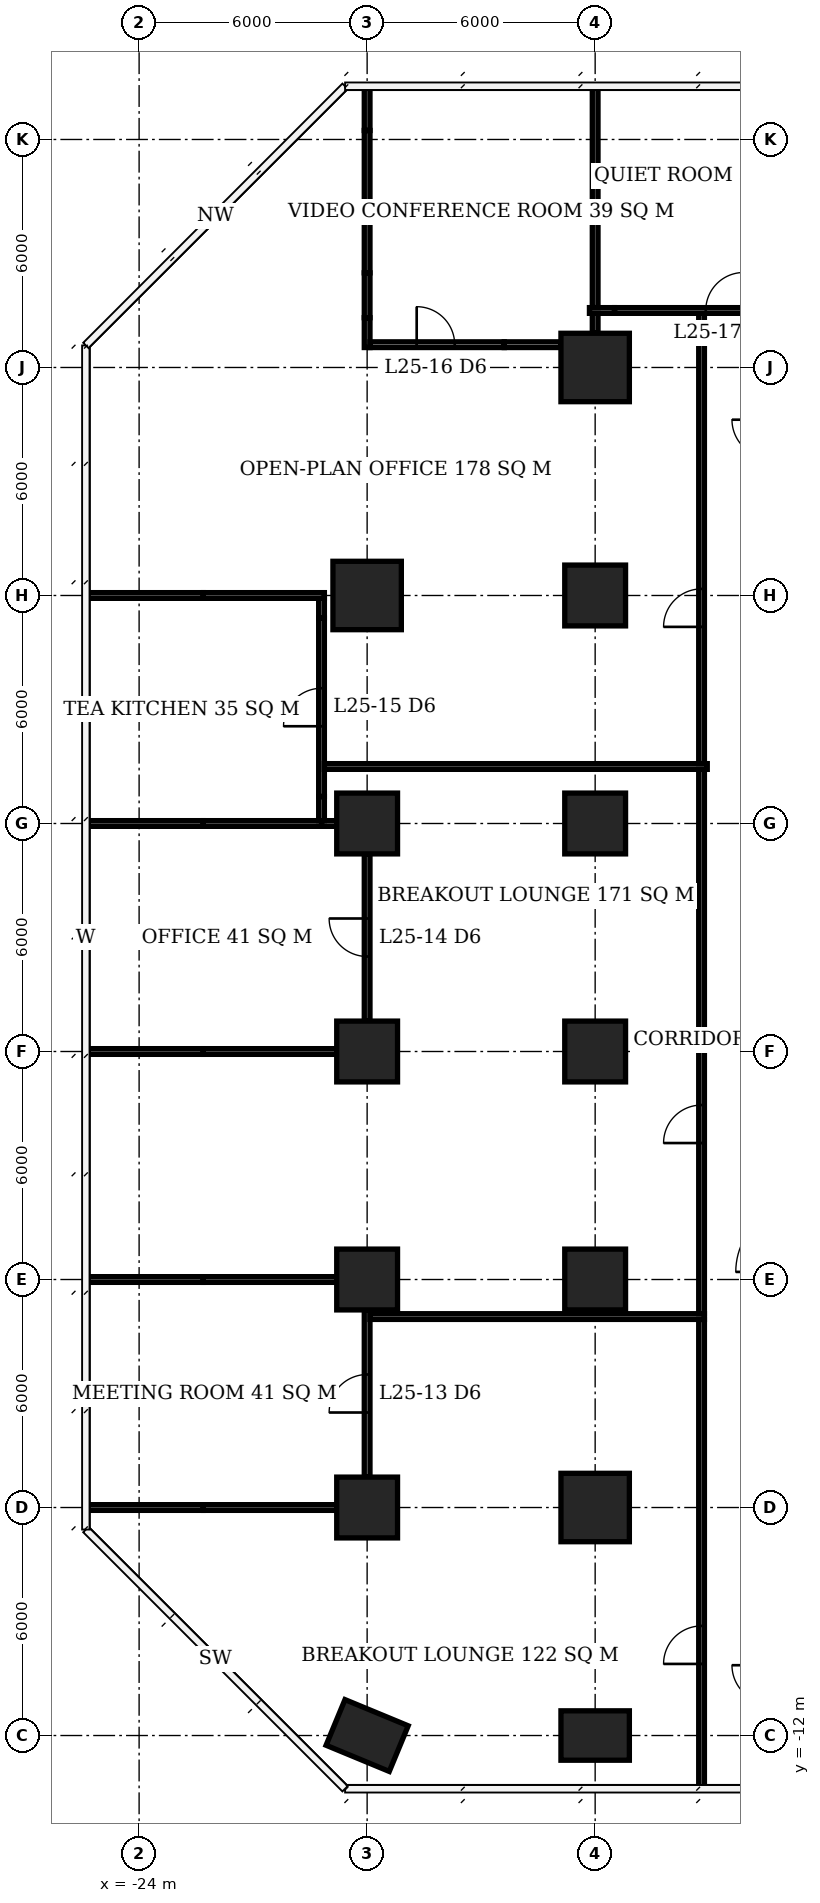
"""IFC4 building model, lengths in metres.
Left out: names, types, materials, properties, quantities, classifications, styles, units other than length and angle.
Written with IfcOpenShell. Run it as: python <this file> out.ifc"""

import sys

from ifc_helpers import new_model, si_unit, direction, frame, frame_2d, origin, origin_2d, place, context, subcontext, project, spatial, rectangle, extrude, element, fill, save


model = new_model("IFC4")
c1 = context("Model", 3, precision=1e-05, world=origin(), true_north=direction((0.0, 1.0)))
c2 = subcontext(c1, "Body", "Model", "MODEL_VIEW")
j1 = project(units=[si_unit("LENGTHUNIT", "METRE"), si_unit("PLANEANGLEUNIT", "RADIAN")], contexts=[c1])
p1 = place(None, origin())
s1 = spatial("IfcSite", under=j1, at=p1, CompositionType="ELEMENT")
p2 = place(p1, origin())
s2 = spatial("IfcBuilding", under=s1, at=p2, CompositionType="ELEMENT")
p3 = place(p2, frame((0.0, 0.0, 105.5)))
s3 = spatial("IfcBuildingStorey", under=s2, at=p3, CompositionType="ELEMENT", Elevation=105.5)
p4 = place(p3, frame((-18.0, -12.0, 0.0), z_axis=(0.0, 0.0, 1.0), x_axis=(-0.923879532511, 0.382683432365, 0.0)))
e1 = element("IfcColumn", 1, at=p4, inside=s3, PredefinedType="COLUMN", context=c2, shape_type="SweptSolid", body=[
    extrude(rectangle(XDim=1.8, YDim=1.3, at=origin_2d()), origin(), (0.0, 0.0, 1.0), 3.9),
])
for number, where, z_axis, x_axis in (
    (2, (-18.0, -6.0, 0.0), (0.0, 0.0, 1.0), (1.0, 0.0, 0.0)),
    (3, (-18.0, 0.0, 0.0), (0.0, 0.0, 1.0), (1.0, 0.0, 0.0)),
    (4, (-18.0, 6.0, 0.0), (0.0, 0.0, 1.0), (1.0, 0.0, 0.0)),
    (5, (-18.0, 12.0, 0.0), (0.0, 0.0, 1.0), (1.0, 0.0, 0.0)),
):
    element("IfcColumn", number, at=place(p3, frame(where, z_axis=z_axis, x_axis=x_axis)), inside=s3, PredefinedType="COLUMN", context=c2, shape_type="SweptSolid", body=[
        extrude(rectangle(XDim=1.6, YDim=1.6, at=origin_2d()), origin(), (0.0, 0.0, 1.0), 3.9),
    ])
p5 = place(p3, frame((-18.0, 18.0, 0.0), z_axis=(0.0, 0.0, 1.0), x_axis=(1.0, 0.0, 0.0)))
e6 = element("IfcColumn", 6, at=p5, inside=s3, PredefinedType="COLUMN", context=c2, shape_type="SweptSolid", body=[
    extrude(rectangle(XDim=1.8, YDim=1.8, at=origin_2d()), origin(), (0.0, 0.0, 1.0), 3.9),
])
p6 = place(p3, frame((-12.0, -12.0, 0.0), z_axis=(0.0, 0.0, 1.0), x_axis=(1.0, 0.0, 0.0)))
e7 = element("IfcColumn", 7, at=p6, inside=s3, PredefinedType="COLUMN", context=c2, shape_type="SweptSolid", body=[
    extrude(rectangle(XDim=1.8, YDim=1.3, at=origin_2d()), origin(), (0.0, 0.0, 1.0), 3.9),
])
p7 = place(p3, frame((-12.0, -6.0, 0.0), z_axis=(0.0, 0.0, 1.0), x_axis=(1.0, 0.0, 0.0)))
e8 = element("IfcColumn", 8, at=p7, inside=s3, PredefinedType="COLUMN", context=c2, shape_type="SweptSolid", body=[
    extrude(rectangle(XDim=1.8, YDim=1.8, at=origin_2d()), origin(), (0.0, 0.0, 1.0), 3.9),
])
for number, where, z_axis, x_axis in (
    (9, (-12.0, 0.0, 0.0), (0.0, 0.0, 1.0), (1.0, 0.0, 0.0)),
    (10, (-12.0, 6.0, 0.0), (0.0, 0.0, 1.0), (1.0, 0.0, 0.0)),
    (11, (-12.0, 12.0, 0.0), (0.0, 0.0, 1.0), (1.0, 0.0, 0.0)),
    (12, (-12.0, 18.0, 0.0), (0.0, 0.0, 1.0), (1.0, 0.0, 0.0)),
):
    element("IfcColumn", number, at=place(p3, frame(where, z_axis=z_axis, x_axis=x_axis)), inside=s3, PredefinedType="COLUMN", context=c2, shape_type="SweptSolid", body=[
        extrude(rectangle(XDim=1.6, YDim=1.6, at=origin_2d()), origin(), (0.0, 0.0, 1.0), 3.9),
    ])
p8 = place(p3, frame((-12.0, 24.0, 0.0), z_axis=(0.0, 0.0, 1.0), x_axis=(1.0, 0.0, 0.0)))
e13 = element("IfcColumn", 13, at=p8, inside=s3, PredefinedType="COLUMN", context=c2, shape_type="SweptSolid", body=[
    extrude(rectangle(XDim=1.8, YDim=1.8, at=origin_2d()), origin(), (0.0, 0.0, 1.0), 3.9),
])
p9 = place(p3, frame((-25.4, -6.0, 0.0), z_axis=(0.0, 0.0, 1.0), x_axis=(1.0, 0.0, 0.0)))
e14 = element("IfcWall", 14, at=p9, inside=s3, PredefinedType="PARTITIONING", context=c2, shape_type="SweptSolid", body=[
    extrude(rectangle(XDim=3.09, YDim=0.15, at=frame_2d((1.545, 0.0))), origin(), (0.0, 0.0, 1.0), 3.65),
])
p10 = place(p3, frame((-22.31, -6.0, 0.0), z_axis=(0.0, 0.0, 1.0), x_axis=(1.0, 0.0, 0.0)))
e15 = element("IfcWall", 15, at=p10, inside=s3, PredefinedType="PARTITIONING", context=c2, shape_type="SweptSolid", body=[
    extrude(rectangle(XDim=3.51, YDim=0.15, at=frame_2d((1.755, 0.0))), origin(), (0.0, 0.0, 1.0), 2.65),
])
p11 = place(p3, frame((-25.4, 0.0, 0.0), z_axis=(0.0, 0.0, 1.0), x_axis=(1.0, 0.0, 0.0)))
e16 = element("IfcWall", 16, at=p11, inside=s3, PredefinedType="PARTITIONING", context=c2, shape_type="SweptSolid", body=[
    extrude(rectangle(XDim=3.09, YDim=0.15, at=frame_2d((1.545, 0.0))), origin(), (0.0, 0.0, 1.0), 3.65),
])
p12 = place(p3, frame((-22.31, 0.0, 0.0), z_axis=(0.0, 0.0, 1.0), x_axis=(1.0, 0.0, 0.0)))
e17 = element("IfcWall", 17, at=p12, inside=s3, PredefinedType="PARTITIONING", context=c2, shape_type="SweptSolid", body=[
    extrude(rectangle(XDim=3.51, YDim=0.15, at=frame_2d((1.755, 0.0))), origin(), (0.0, 0.0, 1.0), 2.65),
])
p13 = place(p3, frame((-25.35, 6.0, 0.0), z_axis=(0.0, 0.0, 1.0), x_axis=(1.0, 0.0, 0.0)))
e18 = element("IfcWall", 18, at=p13, inside=s3, PredefinedType="PARTITIONING", context=c2, shape_type="SweptSolid", body=[
    extrude(rectangle(XDim=3.04, YDim=0.15, at=frame_2d((1.52, 0.0))), origin(), (0.0, 0.0, 1.0), 3.65),
])
p14 = place(p3, frame((-22.31, 6.0, 0.0), z_axis=(0.0, 0.0, 1.0), x_axis=(1.0, 0.0, 0.0)))
e19 = element("IfcWall", 19, at=p14, inside=s3, PredefinedType="PARTITIONING", context=c2, shape_type="SweptSolid", body=[
    extrude(rectangle(XDim=3.51, YDim=0.15, at=frame_2d((1.755, 0.0))), origin(), (0.0, 0.0, 1.0), 2.65),
])
p15 = place(p3, frame((-25.35, 12.0, 0.0), z_axis=(0.0, 0.0, 1.0), x_axis=(1.0, 0.0, 0.0)))
e20 = element("IfcWall", 20, at=p15, inside=s3, PredefinedType="PARTITIONING", context=c2, shape_type="SweptSolid", body=[
    extrude(rectangle(XDim=3.04, YDim=0.15, at=frame_2d((1.52, 0.0))), origin(), (0.0, 0.0, 1.0), 3.65),
])
p16 = place(p3, frame((-22.31, 12.0, 0.0), z_axis=(0.0, 0.0, 1.0), x_axis=(1.0, 0.0, 0.0)))
e21 = element("IfcWall", 21, at=p16, inside=s3, PredefinedType="PARTITIONING", context=c2, shape_type="SweptSolid", body=[
    extrude(rectangle(XDim=3.185, YDim=0.15, at=frame_2d((1.593, 0.0))), origin(), (0.0, 0.0, 1.0), 2.65),
])
p17 = place(p3, frame((-19.2, 12.0, 0.0), z_axis=(0.0, 0.0, 1.0), x_axis=(1.0, 0.0, 0.0)))
e22 = element("IfcWall", 22, at=p17, inside=s3, PredefinedType="PARTITIONING", context=c2, shape_type="SweptSolid", body=[
    extrude(rectangle(XDim=0.4, YDim=0.15, at=frame_2d((0.2, 0.0))), origin(), (0.0, 0.0, 1.0), 2.65),
])
p18 = place(p3, frame((-25.4, 18.0, 0.0), z_axis=(0.0, 0.0, 1.0), x_axis=(1.0, 0.0, 0.0)))
e23 = element("IfcWall", 23, at=p18, inside=s3, PredefinedType="PARTITIONING", context=c2, shape_type="SweptSolid", body=[
    extrude(rectangle(XDim=3.09, YDim=0.15, at=frame_2d((1.545, 0.0))), origin(), (0.0, 0.0, 1.0), 3.65),
])
p19 = place(p3, frame((-22.31, 18.0, 0.0), z_axis=(0.0, 0.0, 1.0), x_axis=(1.0, 0.0, 0.0)))
e24 = element("IfcWall", 24, at=p19, inside=s3, PredefinedType="PARTITIONING", context=c2, shape_type="SweptSolid", body=[
    extrude(rectangle(XDim=3.185, YDim=0.15, at=frame_2d((1.593, 0.0))), origin(), (0.0, 0.0, 1.0), 2.65),
])
p20 = place(p3, frame((-17.925, 24.6, 0.0), z_axis=(0.0, 0.0, 1.0), x_axis=(1.0, 0.0, 0.0)))
e25 = element("IfcWall", 25, at=p20, inside=s3, PredefinedType="PARTITIONING", context=c2, shape_type="SweptSolid", body=[
    extrude(rectangle(XDim=3.533, YDim=0.15, at=frame_2d((1.767, 0.0))), origin(), (0.0, 0.0, 1.0), 3.65),
])
p21 = place(p20, frame((1.229, 0.0, 0.0)))
e26 = element("IfcOpeningElement", 26, at=p21, cuts=e25, PredefinedType="OPENING", context=c2, shape_type="SweptSolid", body=[
    extrude(rectangle(XDim=1.0, YDim=2.1, at=frame_2d((0.5, 1.05))), frame((0.0, 0.085, 0.0), z_axis=(0.0, -1.0, 0.0), x_axis=(1.0, 0.0, 0.0)), (0.0, 0.0, 1.0), 0.17),
])
p22 = place(p3, frame((-14.392, 24.6, 0.0), z_axis=(0.0, 0.0, 1.0), x_axis=(1.0, 0.0, 0.0)))
e27 = element("IfcWall", 27, at=p22, inside=s3, PredefinedType="PARTITIONING", context=c2, shape_type="SweptSolid", body=[
    extrude(rectangle(XDim=1.492, YDim=0.15, at=frame_2d((0.746, 0.0))), origin(), (0.0, 0.0, 1.0), 2.65),
])
p23 = place(p3, frame((-12.15, 25.5, 0.0), z_axis=(0.0, 0.0, 1.0), x_axis=(1.0, 0.0, 0.0)))
e28 = element("IfcWall", 28, at=p23, inside=s3, PredefinedType="PARTITIONING", context=c2, shape_type="SweptSolid", body=[
    extrude(rectangle(XDim=0.66, YDim=0.15, at=frame_2d((0.33, 0.0))), origin(), (0.0, 0.0, 1.0), 2.65),
])
p24 = place(p3, frame((-11.49, 25.5, 0.0), z_axis=(0.0, 0.0, 1.0), x_axis=(1.0, 0.0, 0.0)))
e29 = element("IfcWall", 29, at=p24, inside=s3, PredefinedType="PARTITIONING", context=c2, shape_type="SweptSolid", body=[
    extrude(rectangle(XDim=4.78, YDim=0.15, at=frame_2d((2.39, 0.0))), origin(), (0.0, 0.0, 1.0), 3.65),
])
p25 = place(p24, frame((2.4, 0.0, 0.0)))
e30 = element("IfcOpeningElement", 30, at=p25, cuts=e29, PredefinedType="OPENING", context=c2, shape_type="SweptSolid", body=[
    extrude(rectangle(XDim=1.0, YDim=2.1, at=frame_2d((0.5, 1.05))), frame((0.0, 0.085, 0.0), z_axis=(0.0, -1.0, 0.0), x_axis=(1.0, 0.0, 0.0)), (0.0, 0.0, 1.0), 0.17),
])
p26 = place(p3, frame((-19.2, 12.075, 0.0), z_axis=(0.0, 0.0, 1.0), x_axis=(0.0, 1.0, 0.0)))
e31 = element("IfcWall", 31, at=p26, inside=s3, PredefinedType="PARTITIONING", context=c2, shape_type="SweptSolid", body=[
    extrude(rectangle(XDim=0.635, YDim=0.15, at=frame_2d((0.317, 0.0))), origin(), (0.0, 0.0, 1.0), 2.65),
])
p27 = place(p3, frame((-19.2, 12.71, 0.0), z_axis=(0.0, 0.0, 1.0), x_axis=(0.0, 1.0, 0.0)))
e32 = element("IfcWall", 32, at=p27, inside=s3, PredefinedType="PARTITIONING", context=c2, shape_type="SweptSolid", body=[
    extrude(rectangle(XDim=4.698, YDim=0.15, at=frame_2d((2.349, 0.0))), origin(), (0.0, 0.0, 1.0), 3.65),
])
p28 = place(p27, frame((1.849, 0.0, 0.0)))
e33 = element("IfcOpeningElement", 33, at=p28, cuts=e32, PredefinedType="OPENING", context=c2, shape_type="SweptSolid", body=[
    extrude(rectangle(XDim=1.0, YDim=2.1, at=frame_2d((0.5, 1.05))), frame((0.0, 0.085, 0.0), z_axis=(0.0, -1.0, 0.0), x_axis=(1.0, 0.0, 0.0)), (0.0, 0.0, 1.0), 0.17),
])
p29 = place(p3, frame((-19.2, 17.408, 0.0), z_axis=(0.0, 0.0, 1.0), x_axis=(0.0, 1.0, 0.0)))
e34 = element("IfcWall", 34, at=p29, inside=s3, PredefinedType="PARTITIONING", context=c2, shape_type="SweptSolid", body=[
    extrude(rectangle(XDim=0.517, YDim=0.15, at=frame_2d((0.259, 0.0))), origin(), (0.0, 0.0, 1.0), 2.65),
])
p30 = place(p3, frame((-18.0, -5.2, 0.0), z_axis=(0.0, 0.0, 1.0), x_axis=(0.0, 1.0, 0.0)))
e35 = element("IfcWall", 35, at=p30, inside=s3, PredefinedType="PARTITIONING", context=c2, shape_type="SweptSolid", body=[
    extrude(rectangle(XDim=4.4, YDim=0.15, at=frame_2d((2.2, 0.0))), origin(), (0.0, 0.0, 1.0), 3.65),
])
p31 = place(p30, frame((1.7, 0.0, 0.0)))
e36 = element("IfcOpeningElement", 36, at=p31, cuts=e35, PredefinedType="OPENING", context=c2, shape_type="SweptSolid", body=[
    extrude(rectangle(XDim=1.0, YDim=2.1, at=frame_2d((0.5, 1.05))), frame((0.0, 0.085, 0.0), z_axis=(0.0, -1.0, 0.0), x_axis=(1.0, 0.0, 0.0)), (0.0, 0.0, 1.0), 0.17),
])
p32 = place(p3, frame((-18.0, 6.8, 0.0), z_axis=(0.0, 0.0, 1.0), x_axis=(0.0, 1.0, 0.0)))
e37 = element("IfcWall", 37, at=p32, inside=s3, PredefinedType="PARTITIONING", context=c2, shape_type="SweptSolid", body=[
    extrude(rectangle(XDim=4.4, YDim=0.15, at=frame_2d((2.2, 0.0))), origin(), (0.0, 0.0, 1.0), 3.65),
])
p33 = place(p32, frame((1.7, 0.0, 0.0)))
e38 = element("IfcOpeningElement", 38, at=p33, cuts=e37, PredefinedType="OPENING", context=c2, shape_type="SweptSolid", body=[
    extrude(rectangle(XDim=1.0, YDim=2.1, at=frame_2d((0.5, 1.05))), frame((0.0, 0.085, 0.0), z_axis=(0.0, -1.0, 0.0), x_axis=(1.0, 0.0, 0.0)), (0.0, 0.0, 1.0), 0.17),
])
p34 = place(p3, frame((-18.0, 24.525, 0.0), z_axis=(0.0, 0.0, 1.0), x_axis=(0.0, 1.0, 0.0)))
e39 = element("IfcWall", 39, at=p34, inside=s3, PredefinedType="PARTITIONING", context=c2, shape_type="SweptSolid", body=[
    extrude(rectangle(XDim=0.785, YDim=0.15, at=frame_2d((0.393, 0.0))), origin(), (0.0, 0.0, 1.0), 3.65),
])
p35 = place(p3, frame((-18.0, 25.31, 0.0), z_axis=(0.0, 0.0, 1.0), x_axis=(0.0, 1.0, 0.0)))
e40 = element("IfcWall", 40, at=p35, inside=s3, PredefinedType="PARTITIONING", context=c2, shape_type="SweptSolid", body=[
    extrude(rectangle(XDim=1.18, YDim=0.15, at=frame_2d((0.59, 0.0))), origin(), (0.0, 0.0, 1.0), 2.65),
])
p36 = place(p3, frame((-18.0, 26.49, 0.0), z_axis=(0.0, 0.0, 1.0), x_axis=(0.0, 1.0, 0.0)))
e41 = element("IfcWall", 41, at=p36, inside=s3, PredefinedType="PARTITIONING", context=c2, shape_type="SweptSolid", body=[
    extrude(rectangle(XDim=1.718, YDim=0.15, at=frame_2d((0.859, 0.0))), origin(), (0.0, 0.0, 1.0), 3.65),
])
p37 = place(p3, frame((-18.0, 28.208, 0.0), z_axis=(0.0, 0.0, 1.0), x_axis=(0.0, 1.0, 0.0)))
e42 = element("IfcWall", 42, at=p37, inside=s3, PredefinedType="PARTITIONING", context=c2, shape_type="SweptSolid", body=[
    extrude(rectangle(XDim=2.029, YDim=0.15, at=frame_2d((1.015, 0.0))), origin(), (0.0, 0.0, 1.0), 2.65),
])
p38 = place(p3, frame((-18.0, 30.237, 0.0), z_axis=(0.0, 0.0, 1.0), x_axis=(0.0, 1.0, 0.0)))
e43 = element("IfcWall", 43, at=p38, inside=s3, PredefinedType="PARTITIONING", context=c2, shape_type="SweptSolid", body=[
    extrude(rectangle(XDim=1.163, YDim=0.15, at=frame_2d((0.582, 0.0))), origin(), (0.0, 0.0, 1.0), 3.65),
])
p39 = place(p3, frame((-12.0, 24.9, 0.0), z_axis=(0.0, 0.0, 1.0), x_axis=(0.0, 1.0, 0.0)))
e44 = element("IfcWall", 44, at=p39, inside=s3, PredefinedType="PARTITIONING", context=c2, shape_type="SweptSolid", body=[
    extrude(rectangle(XDim=0.525, YDim=0.15, at=frame_2d((0.263, 0.0))), origin(), (0.0, 0.0, 1.0), 2.65),
])
p40 = place(p3, frame((-12.0, 25.575, 0.0), z_axis=(0.0, 0.0, 1.0), x_axis=(0.0, 1.0, 0.0)))
e45 = element("IfcWall", 45, at=p40, inside=s3, PredefinedType="PARTITIONING", context=c2, shape_type="SweptSolid", body=[
    extrude(rectangle(XDim=2.735, YDim=0.15, at=frame_2d((1.368, 0.0))), origin(), (0.0, 0.0, 1.0), 2.65),
])
p41 = place(p3, frame((-12.0, 28.31, 0.0), z_axis=(0.0, 0.0, 1.0), x_axis=(0.0, 1.0, 0.0)))
e46 = element("IfcWall", 46, at=p41, inside=s3, PredefinedType="PARTITIONING", context=c2, shape_type="SweptSolid", body=[
    extrude(rectangle(XDim=3.09, YDim=0.15, at=frame_2d((1.545, 0.0))), origin(), (0.0, 0.0, 1.0), 3.65),
])
p42 = place(p3, frame((-19.125, 13.5, 0.0), z_axis=(0.0, 0.0, 1.0), x_axis=(1.0, 0.0, 0.0)))
e47 = element("IfcWall", 47, at=p42, inside=s3, PredefinedType="PARTITIONING", context=c2, shape_type="SweptSolid", body=[
    extrude(rectangle(XDim=10.075, YDim=0.15, at=frame_2d((5.038, 0.0))), origin(), (0.0, 0.0, 1.0), 3.65),
])
p43 = place(p3, frame((-17.925, -0.975, 0.0), z_axis=(0.0, 0.0, 1.0), x_axis=(1.0, 0.0, 0.0)))
e48 = element("IfcWall", 48, at=p43, inside=s3, PredefinedType="PARTITIONING", context=c2, shape_type="SweptSolid", body=[
    extrude(rectangle(XDim=8.8, YDim=0.15, at=frame_2d((4.4, 0.0))), origin(), (0.0, 0.0, 1.0), 3.65),
])
p44 = place(p3, frame((-9.2, -13.35, 0.0), z_axis=(0.0, 0.0, 1.0), x_axis=(0.0, 1.0, 0.0)))
e49 = element("IfcWall", 49, at=p44, inside=s3, PredefinedType="PARTITIONING", context=c2, shape_type="SweptSolid", body=[
    extrude(rectangle(XDim=12.3, YDim=0.15, at=frame_2d((6.15, 0.0))), origin(), (0.0, 0.0, 1.0), 3.65),
])
p45 = place(p44, frame((3.234, 0.0, 0.0)))
e50 = element("IfcOpeningElement", 50, at=p45, cuts=e49, PredefinedType="OPENING", context=c2, shape_type="SweptSolid", body=[
    extrude(rectangle(XDim=1.0, YDim=2.1, at=frame_2d((0.5, 1.05))), frame((0.0, 0.085, 0.0), z_axis=(0.0, -1.0, 0.0), x_axis=(1.0, 0.0, 0.0)), (0.0, 0.0, 1.0), 0.17),
])
p46 = place(p3, frame((-9.2, -0.9, 0.0), z_axis=(0.0, 0.0, 1.0), x_axis=(0.0, 1.0, 0.0)))
e51 = element("IfcWall", 51, at=p46, inside=s3, PredefinedType="PARTITIONING", context=c2, shape_type="SweptSolid", body=[
    extrude(rectangle(XDim=14.325, YDim=0.15, at=frame_2d((7.163, 0.0))), origin(), (0.0, 0.0, 1.0), 3.65),
])
p47 = place(p46, frame((4.491, 0.0, 0.0)))
e52 = element("IfcOpeningElement", 52, at=p47, cuts=e51, PredefinedType="OPENING", context=c2, shape_type="SweptSolid", body=[
    extrude(rectangle(XDim=1.0, YDim=2.1, at=frame_2d((0.5, 1.05))), frame((0.0, 0.085, 0.0), z_axis=(0.0, -1.0, 0.0), x_axis=(1.0, 0.0, 0.0)), (0.0, 0.0, 1.0), 0.17),
])
p48 = place(p3, frame((-9.2, 13.575, 0.0), z_axis=(0.0, 0.0, 1.0), x_axis=(0.0, 1.0, 0.0)))
e53 = element("IfcWall", 53, at=p48, inside=s3, PredefinedType="PARTITIONING", context=c2, shape_type="SweptSolid", body=[
    extrude(rectangle(XDim=11.85, YDim=0.15, at=frame_2d((5.925, 0.0))), origin(), (0.0, 0.0, 1.0), 3.65),
])
p49 = place(p48, frame((3.599, 0.0, 0.0)))
e54 = element("IfcOpeningElement", 54, at=p49, cuts=e53, PredefinedType="OPENING", context=c2, shape_type="SweptSolid", body=[
    extrude(rectangle(XDim=1.0, YDim=2.1, at=frame_2d((0.5, 1.05))), frame((0.0, 0.085, 0.0), z_axis=(0.0, -1.0, 0.0), x_axis=(1.0, 0.0, 0.0)), (0.0, 0.0, 1.0), 0.17),
])
p50 = place(p31, origin())
e55 = element("IfcDoor", 55, at=p50, inside=s3, OperationType="SINGLE_SWING_LEFT", PredefinedType="DOOR", context=c2, shape_type="SweptSolid", body=[
    extrude(rectangle(XDim=1.0, YDim=2.1, at=frame_2d((0.5, 1.05))), frame((0.0, 0.025, 0.0), z_axis=(0.0, -1.0, 0.0), x_axis=(1.0, 0.0, 0.0)), (0.0, 0.0, 1.0), 0.05),
])
fill(e36, e55)
p51 = place(p33, origin())
e56 = element("IfcDoor", 56, at=p51, inside=s3, OperationType="SINGLE_SWING_RIGHT", PredefinedType="DOOR", context=c2, shape_type="SweptSolid", body=[
    extrude(rectangle(XDim=1.0, YDim=2.1, at=frame_2d((0.5, 1.05))), frame((0.0, 0.025, 0.0), z_axis=(0.0, -1.0, 0.0), x_axis=(1.0, 0.0, 0.0)), (0.0, 0.0, 1.0), 0.05),
])
fill(e38, e56)
p52 = place(p28, origin())
e57 = element("IfcDoor", 57, at=p52, inside=s3, OperationType="SINGLE_SWING_LEFT", PredefinedType="DOOR", context=c2, shape_type="SweptSolid", body=[
    extrude(rectangle(XDim=1.0, YDim=2.1, at=frame_2d((0.5, 1.05))), frame((0.0, 0.025, 0.0), z_axis=(0.0, -1.0, 0.0), x_axis=(1.0, 0.0, 0.0)), (0.0, 0.0, 1.0), 0.05),
])
fill(e33, e57)
p53 = place(p21, origin())
e58 = element("IfcDoor", 58, at=p53, inside=s3, OperationType="SINGLE_SWING_LEFT", PredefinedType="DOOR", context=c2, shape_type="SweptSolid", body=[
    extrude(rectangle(XDim=1.0, YDim=2.1, at=frame_2d((0.5, 1.05))), frame((0.0, 0.025, 0.0), z_axis=(0.0, -1.0, 0.0), x_axis=(1.0, 0.0, 0.0)), (0.0, 0.0, 1.0), 0.05),
])
fill(e26, e58)
p54 = place(p25, origin())
e59 = element("IfcDoor", 59, at=p54, inside=s3, OperationType="SINGLE_SWING_RIGHT", PredefinedType="DOOR", context=c2, shape_type="SweptSolid", body=[
    extrude(rectangle(XDim=1.0, YDim=2.1, at=frame_2d((0.5, 1.05))), frame((0.0, 0.025, 0.0), z_axis=(0.0, -1.0, 0.0), x_axis=(1.0, 0.0, 0.0)), (0.0, 0.0, 1.0), 0.05),
])
fill(e30, e59)
p55 = place(p45, origin())
e60 = element("IfcDoor", 60, at=p55, inside=s3, OperationType="SINGLE_SWING_LEFT", PredefinedType="DOOR", context=c2, shape_type="SweptSolid", body=[
    extrude(rectangle(XDim=1.0, YDim=2.1, at=frame_2d((0.5, 1.05))), frame((0.0, 0.025, 0.0), z_axis=(0.0, -1.0, 0.0), x_axis=(1.0, 0.0, 0.0)), (0.0, 0.0, 1.0), 0.05),
])
fill(e50, e60)
p56 = place(p47, origin())
e61 = element("IfcDoor", 61, at=p56, inside=s3, OperationType="SINGLE_SWING_LEFT", PredefinedType="DOOR", context=c2, shape_type="SweptSolid", body=[
    extrude(rectangle(XDim=1.0, YDim=2.1, at=frame_2d((0.5, 1.05))), frame((0.0, 0.025, 0.0), z_axis=(0.0, -1.0, 0.0), x_axis=(1.0, 0.0, 0.0)), (0.0, 0.0, 1.0), 0.05),
])
fill(e52, e61)
p57 = place(p49, origin())
e62 = element("IfcDoor", 62, at=p57, inside=s3, OperationType="SINGLE_SWING_LEFT", PredefinedType="DOOR", context=c2, shape_type="SweptSolid", body=[
    extrude(rectangle(XDim=1.0, YDim=2.1, at=frame_2d((0.5, 1.05))), frame((0.0, 0.025, 0.0), z_axis=(0.0, -1.0, 0.0), x_axis=(1.0, 0.0, 0.0)), (0.0, 0.0, 1.0), 0.05),
])
fill(e54, e62)
save(model, sys.argv[1])
